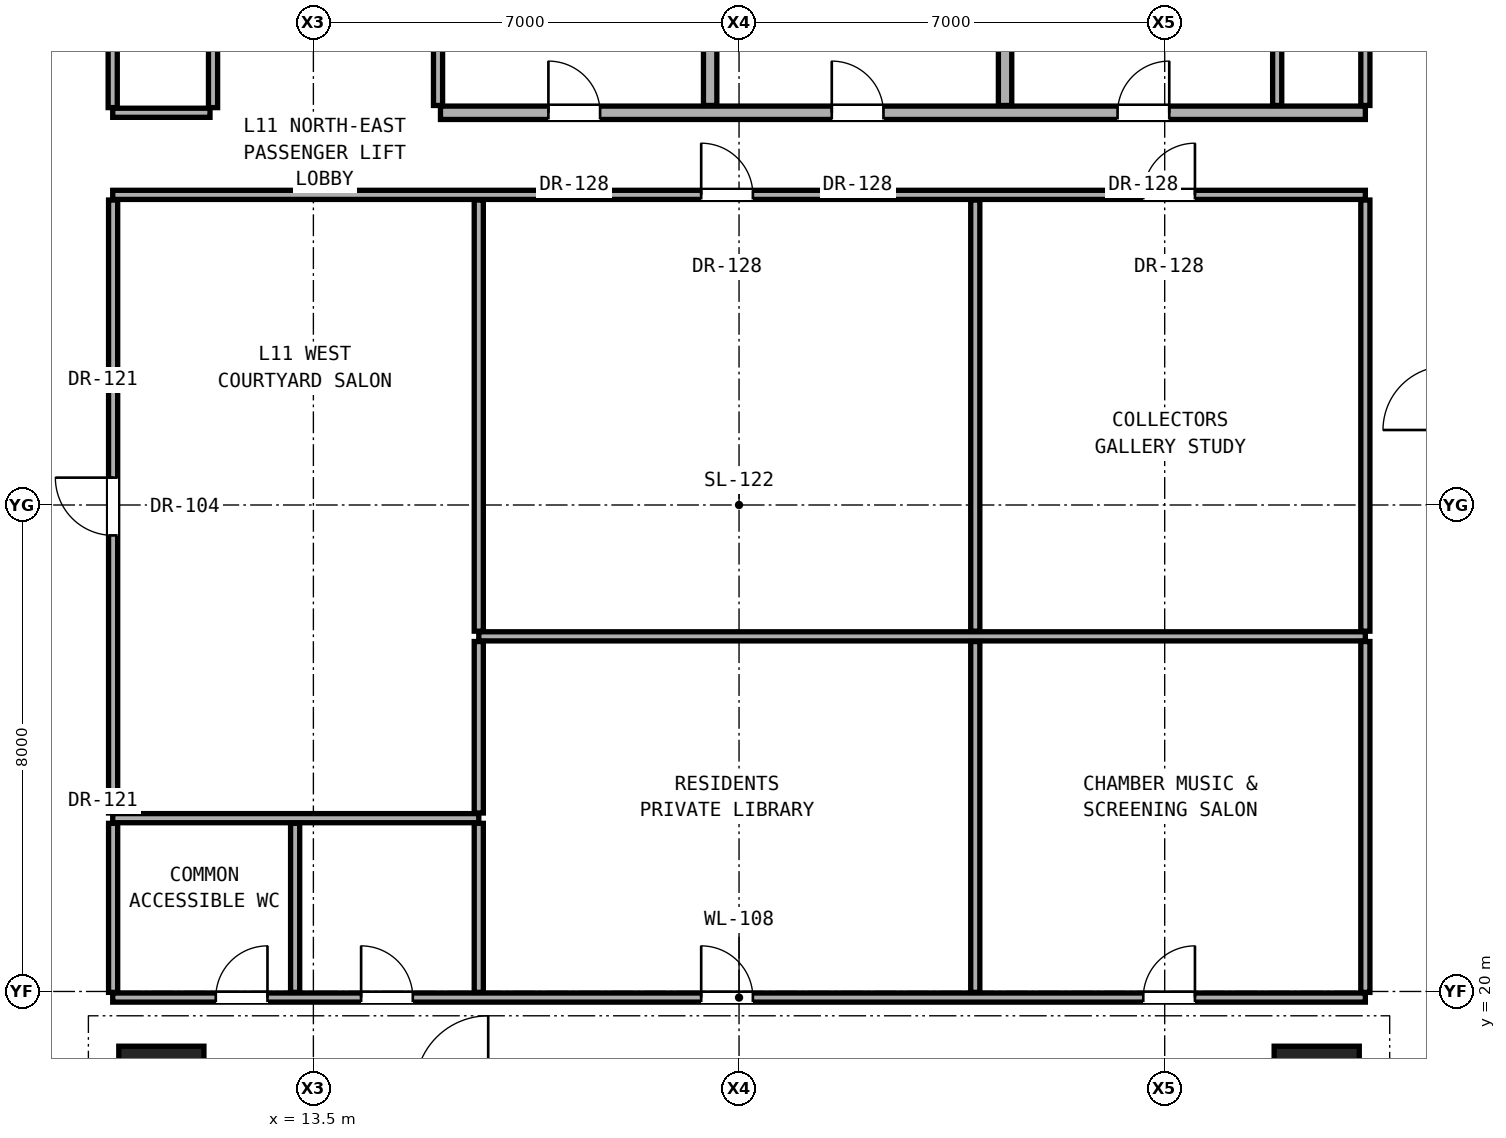
"""IFC4 building model, lengths in metres.
Left out: names, types, materials, properties, quantities, classifications, styles, units other than length and angle.
Written with IfcOpenShell. Run it as: python <this file> out.ifc"""

import sys

from ifc_helpers import new_model, si_unit, direction, frame, frame_2d, origin, origin_2d, place, context, subcontext, project, spatial, rectangle, extrude, element, fill, save


model = new_model("IFC4")
c1 = context("Model", 3, precision=1e-05, world=origin(), true_north=direction((0.0, 1.0)))
c2 = subcontext(c1, "Body", "Model", "MODEL_VIEW")
j1 = project(units=[si_unit("LENGTHUNIT", "METRE"), si_unit("PLANEANGLEUNIT", "RADIAN")], contexts=[c1])
p1 = place(None, origin())
s1 = spatial("IfcSite", under=j1, at=p1, CompositionType="ELEMENT")
p2 = place(p1, origin())
s2 = spatial("IfcBuilding", under=s1, at=p2, CompositionType="ELEMENT")
p3 = place(p2, frame((0.0, 0.0, 42.2)))
s3 = spatial("IfcBuildingStorey", under=s2, at=p3, CompositionType="ELEMENT", Elevation=42.2)
for number, where, z_axis, x_axis in (
    (1, (11.0, 18.4, 0.0), (0.0, 0.0, 1.0), (1.0, 0.0, 0.0)),
    (2, (30.0, 18.4, 0.0), (0.0, 0.0, 1.0), (1.0, 0.0, 0.0)),
):
    element("IfcColumn", number, at=place(p3, frame(where, z_axis=z_axis, x_axis=x_axis)), inside=s3, PredefinedType="COLUMN", context=c2, shape_type="SweptSolid", body=[
        extrude(rectangle(XDim=1.4, YDim=1.4, at=origin_2d()), origin(), (0.0, 0.0, 1.0), 3.3),
    ])
p4 = place(p3, frame((10.2, 19.9, 0.0), z_axis=(0.0, 0.0, 1.0), x_axis=(1.0, 0.0, 0.0)))
e3 = element("IfcWall", 3, at=p4, inside=s3, PredefinedType="PARTITIONING", context=c2, shape_type="SweptSolid", body=[
    extrude(rectangle(XDim=20.6, YDim=0.15, at=frame_2d((10.3, 0.0))), origin(), (0.0, 0.0, 1.0), 2.104),
])
p5 = place(p4, frame((1.695, 0.0, 0.0)))
e4 = element("IfcOpeningElement", 4, at=p5, cuts=e3, PredefinedType="OPENING", context=c2, shape_type="SweptSolid", body=[
    extrude(rectangle(XDim=0.85, YDim=2.01, at=frame_2d((0.425, 1.005))), frame((0.0, 0.085, 0.0), z_axis=(0.0, -1.0, 0.0), x_axis=(1.0, 0.0, 0.0)), (0.0, 0.0, 1.0), 0.17),
])
p6 = place(p4, frame((4.085, 0.0, 0.0)))
e5 = element("IfcOpeningElement", 5, at=p6, cuts=e3, PredefinedType="OPENING", context=c2, shape_type="SweptSolid", body=[
    extrude(rectangle(XDim=0.85, YDim=2.01, at=frame_2d((0.425, 1.005))), frame((0.0, 0.085, 0.0), z_axis=(0.0, -1.0, 0.0), x_axis=(1.0, 0.0, 0.0)), (0.0, 0.0, 1.0), 0.17),
])
p7 = place(p4, frame((9.677, 0.0, 0.0)))
e6 = element("IfcOpeningElement", 6, at=p7, cuts=e3, PredefinedType="OPENING", context=c2, shape_type="SweptSolid", body=[
    extrude(rectangle(XDim=0.85, YDim=2.01, at=frame_2d((0.425, 1.005))), frame((0.0, 0.085, 0.0), z_axis=(0.0, -1.0, 0.0), x_axis=(1.0, 0.0, 0.0)), (0.0, 0.0, 1.0), 0.17),
])
p8 = place(p4, frame((16.948, 0.0, 0.0)))
e7 = element("IfcOpeningElement", 7, at=p8, cuts=e3, PredefinedType="OPENING", context=c2, shape_type="SweptSolid", body=[
    extrude(rectangle(XDim=0.85, YDim=2.01, at=frame_2d((0.425, 1.005))), frame((0.0, 0.085, 0.0), z_axis=(0.0, -1.0, 0.0), x_axis=(1.0, 0.0, 0.0)), (0.0, 0.0, 1.0), 0.17),
])
p9 = place(p3, frame((10.2, 22.85, 0.0), z_axis=(0.0, 0.0, 1.0), x_axis=(1.0, 0.0, 0.0)))
e8 = element("IfcWall", 8, at=p9, inside=s3, PredefinedType="PARTITIONING", context=c2, shape_type="SweptSolid", body=[
    extrude(rectangle(XDim=6.02, YDim=0.15, at=frame_2d((3.01, 0.0))), origin(), (0.0, 0.0, 1.0), 2.104),
])
p10 = place(p3, frame((16.22, 25.84, 0.0), z_axis=(0.0, 0.0, 1.0), x_axis=(1.0, 0.0, 0.0)))
e9 = element("IfcWall", 9, at=p10, inside=s3, PredefinedType="PARTITIONING", context=c2, shape_type="SweptSolid", body=[
    extrude(rectangle(XDim=14.58, YDim=0.15, at=frame_2d((7.29, 0.0))), origin(), (0.0, 0.0, 1.0), 2.104),
])
p11 = place(p3, frame((10.2, 33.1, 0.0), z_axis=(0.0, 0.0, 1.0), x_axis=(1.0, 0.0, 0.0)))
e10 = element("IfcWall", 10, at=p11, inside=s3, PredefinedType="PARTITIONING", context=c2, shape_type="SweptSolid", body=[
    extrude(rectangle(XDim=20.6, YDim=0.15, at=frame_2d((10.3, 0.0))), origin(), (0.0, 0.0, 1.0), 2.104),
])
p12 = place(p11, frame((9.677, 0.0, 0.0)))
e11 = element("IfcOpeningElement", 11, at=p12, cuts=e10, PredefinedType="OPENING", context=c2, shape_type="SweptSolid", body=[
    extrude(rectangle(XDim=0.85, YDim=2.01, at=frame_2d((0.425, 1.005))), frame((0.0, 0.085, 0.0), z_axis=(0.0, -1.0, 0.0), x_axis=(1.0, 0.0, 0.0)), (0.0, 0.0, 1.0), 0.17),
])
p13 = place(p11, frame((16.948, 0.0, 0.0)))
e12 = element("IfcOpeningElement", 12, at=p13, cuts=e10, PredefinedType="OPENING", context=c2, shape_type="SweptSolid", body=[
    extrude(rectangle(XDim=0.85, YDim=2.01, at=frame_2d((0.425, 1.005))), frame((0.0, 0.085, 0.0), z_axis=(0.0, -1.0, 0.0), x_axis=(1.0, 0.0, 0.0)), (0.0, 0.0, 1.0), 0.17),
])
p14 = place(p3, frame((10.2, 34.45, 0.0), z_axis=(0.0, 0.0, 1.0), x_axis=(1.0, 0.0, 0.0)))
e13 = element("IfcWall", 13, at=p14, inside=s3, PredefinedType="PARTITIONING", context=c2, shape_type="SweptSolid", body=[
    extrude(rectangle(XDim=1.6, YDim=0.15, at=frame_2d((0.8, 0.0))), origin(), (0.0, 0.0, 1.0), 2.104),
])
p15 = place(p3, frame((15.59, 34.45, 0.0), z_axis=(0.0, 0.0, 1.0), x_axis=(1.0, 0.0, 0.0)))
e14 = element("IfcWall", 14, at=p15, inside=s3, PredefinedType="SOLIDWALL", context=c2, shape_type="SweptSolid", body=[
    extrude(rectangle(XDim=15.21, YDim=0.22, at=frame_2d((7.605, 0.0))), origin(), (0.0, 0.0, 1.0), 2.104),
])
p16 = place(p15, frame((6.435, 0.0, 0.0)))
e15 = element("IfcOpeningElement", 15, at=p16, cuts=e14, PredefinedType="OPENING", context=c2, shape_type="SweptSolid", body=[
    extrude(rectangle(XDim=0.85, YDim=2.01, at=frame_2d((0.425, 1.005))), frame((0.0, 0.12, 0.0), z_axis=(0.0, -1.0, 0.0), x_axis=(1.0, 0.0, 0.0)), (0.0, 0.0, 1.0), 0.24),
])
p17 = place(p15, frame((11.135, 0.0, 0.0)))
e16 = element("IfcOpeningElement", 16, at=p17, cuts=e14, PredefinedType="OPENING", context=c2, shape_type="SweptSolid", body=[
    extrude(rectangle(XDim=0.85, YDim=2.01, at=frame_2d((0.425, 1.005))), frame((0.0, 0.12, 0.0), z_axis=(0.0, -1.0, 0.0), x_axis=(1.0, 0.0, 0.0)), (0.0, 0.0, 1.0), 0.24),
])
p18 = place(p15, frame((1.775, 0.0, 0.0)))
e17 = element("IfcOpeningElement", 17, at=p18, cuts=e14, PredefinedType="OPENING", context=c2, shape_type="SweptSolid", body=[
    extrude(rectangle(XDim=0.85, YDim=2.01, at=frame_2d((0.425, 1.005))), frame((0.0, 0.12, 0.0), z_axis=(0.0, -1.0, 0.0), x_axis=(1.0, 0.0, 0.0)), (0.0, 0.0, 1.0), 0.24),
])
p19 = place(p3, frame((10.207, 19.985, 0.0), z_axis=(0.0, 0.0, 1.0), x_axis=(0.0, 1.0, 0.0)))
e18 = element("IfcWall", 18, at=p19, inside=s3, PredefinedType="PARTITIONING", context=c2, shape_type="SweptSolid", body=[
    extrude(rectangle(XDim=2.78, YDim=0.15, at=frame_2d((1.39, 0.0))), origin(), (0.0, 0.0, 1.0), 3.06),
])
p20 = place(p3, frame((10.207, 22.935, 0.0), z_axis=(0.0, 0.0, 1.0), x_axis=(0.0, 1.0, 0.0)))
e19 = element("IfcWall", 19, at=p20, inside=s3, PredefinedType="PARTITIONING", context=c2, shape_type="SweptSolid", body=[
    extrude(rectangle(XDim=10.08, YDim=0.15, at=frame_2d((5.04, 0.0))), origin(), (0.0, 0.0, 1.0), 2.279),
])
p21 = place(p20, frame((4.565, 0.0, 0.0)))
e20 = element("IfcOpeningElement", 20, at=p21, cuts=e19, PredefinedType="OPENING", context=c2, shape_type="SweptSolid", body=[
    extrude(rectangle(XDim=0.95, YDim=2.15, at=frame_2d((0.475, 1.075))), frame((0.0, 0.085, 0.0), z_axis=(0.0, -1.0, 0.0), x_axis=(1.0, 0.0, 0.0)), (0.0, 0.0, 1.0), 0.17),
])
p22 = place(p3, frame((10.2, 34.535, 0.0), z_axis=(0.0, 0.0, 1.0), x_axis=(0.0, 1.0, 0.0)))
e21 = element("IfcWall", 21, at=p22, inside=s3, PredefinedType="PARTITIONING", context=c2, shape_type="SweptSolid", body=[
    extrude(rectangle(XDim=9.13, YDim=0.15, at=frame_2d((4.565, 0.0))), origin(), (0.0, 0.0, 1.0), 2.436),
])
p23 = place(p3, frame((11.85, 34.535, 0.0), z_axis=(0.0, 0.0, 1.0), x_axis=(0.0, 1.0, 0.0)))
e22 = element("IfcWall", 22, at=p23, inside=s3, PredefinedType="PARTITIONING", context=c2, shape_type="SweptSolid", body=[
    extrude(rectangle(XDim=2.695, YDim=0.15, at=frame_2d((1.348, 0.0))), origin(), (0.0, 0.0, 1.0), 3.06),
])
p24 = place(p3, frame((13.2, 19.985, 0.0), z_axis=(0.0, 0.0, 1.0), x_axis=(0.0, 1.0, 0.0)))
e23 = element("IfcWall", 23, at=p24, inside=s3, PredefinedType="PARTITIONING", context=c2, shape_type="SweptSolid", body=[
    extrude(rectangle(XDim=2.78, YDim=0.15, at=frame_2d((1.39, 0.0))), origin(), (0.0, 0.0, 1.0), 3.06),
])
p25 = place(p3, frame((15.55, 34.57, 0.0), z_axis=(0.0, 0.0, 1.0), x_axis=(0.0, 1.0, 0.0)))
e24 = element("IfcWall", 24, at=p25, inside=s3, PredefinedType="PARTITIONING", context=c2, shape_type="SweptSolid", body=[
    extrude(rectangle(XDim=2.66, YDim=0.15, at=frame_2d((1.33, 0.0))), origin(), (0.0, 0.0, 1.0), 2.589),
])
p26 = place(p3, frame((16.22, 19.985, 0.0), z_axis=(0.0, 0.0, 1.0), x_axis=(0.0, 1.0, 0.0)))
e25 = element("IfcWall", 25, at=p26, inside=s3, PredefinedType="PARTITIONING", context=c2, shape_type="SweptSolid", body=[
    extrude(rectangle(XDim=2.78, YDim=0.15, at=frame_2d((1.39, 0.0))), origin(), (0.0, 0.0, 1.0), 3.06),
])
p27 = place(p3, frame((16.22, 22.935, 0.0), z_axis=(0.0, 0.0, 1.0), x_axis=(0.0, 1.0, 0.0)))
e26 = element("IfcWall", 26, at=p27, inside=s3, PredefinedType="PARTITIONING", context=c2, shape_type="SweptSolid", body=[
    extrude(rectangle(XDim=2.82, YDim=0.15, at=frame_2d((1.41, 0.0))), origin(), (0.0, 0.0, 1.0), 2.104),
])
p28 = place(p3, frame((16.22, 25.925, 0.0), z_axis=(0.0, 0.0, 1.0), x_axis=(0.0, 1.0, 0.0)))
e27 = element("IfcWall", 27, at=p28, inside=s3, PredefinedType="PARTITIONING", context=c2, shape_type="SweptSolid", body=[
    extrude(rectangle(XDim=7.09, YDim=0.15, at=frame_2d((3.545, 0.0))), origin(), (0.0, 0.0, 1.0), 2.104),
])
p29 = place(p3, frame((20.025, 34.57, 0.0), z_axis=(0.0, 0.0, 1.0), x_axis=(0.0, 1.0, 0.0)))
e28 = element("IfcWall", 28, at=p29, inside=s3, PredefinedType="SOLIDWALL", context=c2, shape_type="SweptSolid", body=[
    extrude(rectangle(XDim=2.66, YDim=0.22, at=frame_2d((1.33, 0.0))), origin(), (0.0, 0.0, 1.0), 3.06),
])
p30 = place(p3, frame((24.385, 19.985, 0.0), z_axis=(0.0, 0.0, 1.0), x_axis=(0.0, 1.0, 0.0)))
e29 = element("IfcWall", 29, at=p30, inside=s3, PredefinedType="PARTITIONING", context=c2, shape_type="SweptSolid", body=[
    extrude(rectangle(XDim=5.77, YDim=0.15, at=frame_2d((2.885, 0.0))), origin(), (0.0, 0.0, 1.0), 2.104),
])
p31 = place(p3, frame((24.385, 25.925, 0.0), z_axis=(0.0, 0.0, 1.0), x_axis=(0.0, 1.0, 0.0)))
e30 = element("IfcWall", 30, at=p31, inside=s3, PredefinedType="PARTITIONING", context=c2, shape_type="SweptSolid", body=[
    extrude(rectangle(XDim=7.09, YDim=0.15, at=frame_2d((3.545, 0.0))), origin(), (0.0, 0.0, 1.0), 2.104),
])
p32 = place(p3, frame((24.875, 34.57, 0.0), z_axis=(0.0, 0.0, 1.0), x_axis=(0.0, 1.0, 0.0)))
e31 = element("IfcWall", 31, at=p32, inside=s3, PredefinedType="SOLIDWALL", context=c2, shape_type="SweptSolid", body=[
    extrude(rectangle(XDim=2.66, YDim=0.22, at=frame_2d((1.33, 0.0))), origin(), (0.0, 0.0, 1.0), 3.06),
])
p33 = place(p3, frame((29.35, 34.57, 0.0), z_axis=(0.0, 0.0, 1.0), x_axis=(0.0, 1.0, 0.0)))
e32 = element("IfcWall", 32, at=p33, inside=s3, PredefinedType="PARTITIONING", context=c2, shape_type="SweptSolid", body=[
    extrude(rectangle(XDim=2.66, YDim=0.15, at=frame_2d((1.33, 0.0))), origin(), (0.0, 0.0, 1.0), 3.06),
])
p34 = place(p3, frame((30.8, 19.985, 0.0), z_axis=(0.0, 0.0, 1.0), x_axis=(0.0, 1.0, 0.0)))
e33 = element("IfcWall", 33, at=p34, inside=s3, PredefinedType="PARTITIONING", context=c2, shape_type="SweptSolid", body=[
    extrude(rectangle(XDim=5.77, YDim=0.15, at=frame_2d((2.885, 0.0))), origin(), (0.0, 0.0, 1.0), 2.279),
])
p35 = place(p3, frame((30.8, 25.925, 0.0), z_axis=(0.0, 0.0, 1.0), x_axis=(0.0, 1.0, 0.0)))
e34 = element("IfcWall", 34, at=p35, inside=s3, PredefinedType="PARTITIONING", context=c2, shape_type="SweptSolid", body=[
    extrude(rectangle(XDim=7.09, YDim=0.15, at=frame_2d((3.545, 0.0))), origin(), (0.0, 0.0, 1.0), 2.279),
])
p36 = place(p3, frame((30.8, 34.57, 0.0), z_axis=(0.0, 0.0, 1.0), x_axis=(0.0, 1.0, 0.0)))
e35 = element("IfcWall", 35, at=p36, inside=s3, PredefinedType="PARTITIONING", context=c2, shape_type="SweptSolid", body=[
    extrude(rectangle(XDim=9.095, YDim=0.15, at=frame_2d((4.547, 0.0))), origin(), (0.0, 0.0, 1.0), 2.436),
])
p37 = place(p16, origin())
e36 = element("IfcDoor", 36, at=p37, inside=s3, OperationType="SINGLE_SWING_LEFT", PredefinedType="DOOR", context=c2, shape_type="SweptSolid", body=[
    extrude(rectangle(XDim=0.85, YDim=2.01, at=frame_2d((0.425, 1.005))), frame((0.0, 0.025, 0.0), z_axis=(0.0, -1.0, 0.0), x_axis=(1.0, 0.0, 0.0)), (0.0, 0.0, 1.0), 0.05),
])
fill(e15, e36)
p38 = place(p17, origin())
e37 = element("IfcDoor", 37, at=p38, inside=s3, OperationType="SINGLE_SWING_RIGHT", PredefinedType="DOOR", context=c2, shape_type="SweptSolid", body=[
    extrude(rectangle(XDim=0.85, YDim=2.01, at=frame_2d((0.425, 1.005))), frame((0.0, 0.025, 0.0), z_axis=(0.0, -1.0, 0.0), x_axis=(1.0, 0.0, 0.0)), (0.0, 0.0, 1.0), 0.05),
])
fill(e16, e37)
p39 = place(p18, origin())
e38 = element("IfcDoor", 38, at=p39, inside=s3, OperationType="SINGLE_SWING_LEFT", PredefinedType="DOOR", context=c2, shape_type="SweptSolid", body=[
    extrude(rectangle(XDim=0.85, YDim=2.01, at=frame_2d((0.425, 1.005))), frame((0.0, 0.025, 0.0), z_axis=(0.0, -1.0, 0.0), x_axis=(1.0, 0.0, 0.0)), (0.0, 0.0, 1.0), 0.05),
])
fill(e17, e38)
p40 = place(p5, origin())
e39 = element("IfcDoor", 39, at=p40, inside=s3, OperationType="SINGLE_SWING_RIGHT", PredefinedType="DOOR", context=c2, shape_type="SweptSolid", body=[
    extrude(rectangle(XDim=0.85, YDim=2.01, at=frame_2d((0.425, 1.005))), frame((0.0, 0.025, 0.0), z_axis=(0.0, -1.0, 0.0), x_axis=(1.0, 0.0, 0.0)), (0.0, 0.0, 1.0), 0.05),
])
fill(e4, e39)
p41 = place(p6, origin())
e40 = element("IfcDoor", 40, at=p41, inside=s3, OperationType="SINGLE_SWING_LEFT", PredefinedType="DOOR", context=c2, shape_type="SweptSolid", body=[
    extrude(rectangle(XDim=0.85, YDim=2.01, at=frame_2d((0.425, 1.005))), frame((0.0, 0.025, 0.0), z_axis=(0.0, -1.0, 0.0), x_axis=(1.0, 0.0, 0.0)), (0.0, 0.0, 1.0), 0.05),
])
fill(e5, e40)
p42 = place(p21, origin())
e41 = element("IfcDoor", 41, at=p42, inside=s3, OperationType="SINGLE_SWING_RIGHT", PredefinedType="DOOR", context=c2, shape_type="SweptSolid", body=[
    extrude(rectangle(XDim=0.95, YDim=2.15, at=frame_2d((0.475, 1.075))), frame((0.0, 0.025, 0.0), z_axis=(0.0, -1.0, 0.0), x_axis=(1.0, 0.0, 0.0)), (0.0, 0.0, 1.0), 0.05),
])
fill(e20, e41)
p43 = place(p7, origin())
e42 = element("IfcDoor", 42, at=p43, inside=s3, OperationType="SINGLE_SWING_LEFT", PredefinedType="DOOR", context=c2, shape_type="SweptSolid", body=[
    extrude(rectangle(XDim=0.85, YDim=2.01, at=frame_2d((0.425, 1.005))), frame((0.0, 0.025, 0.0), z_axis=(0.0, -1.0, 0.0), x_axis=(1.0, 0.0, 0.0)), (0.0, 0.0, 1.0), 0.05),
])
fill(e6, e42)
p44 = place(p8, origin())
e43 = element("IfcDoor", 43, at=p44, inside=s3, OperationType="SINGLE_SWING_RIGHT", PredefinedType="DOOR", context=c2, shape_type="SweptSolid", body=[
    extrude(rectangle(XDim=0.85, YDim=2.01, at=frame_2d((0.425, 1.005))), frame((0.0, 0.025, 0.0), z_axis=(0.0, -1.0, 0.0), x_axis=(1.0, 0.0, 0.0)), (0.0, 0.0, 1.0), 0.05),
])
fill(e7, e43)
p45 = place(p12, origin())
e44 = element("IfcDoor", 44, at=p45, inside=s3, OperationType="SINGLE_SWING_LEFT", PredefinedType="DOOR", context=c2, shape_type="SweptSolid", body=[
    extrude(rectangle(XDim=0.85, YDim=2.01, at=frame_2d((0.425, 1.005))), frame((0.0, 0.025, 0.0), z_axis=(0.0, -1.0, 0.0), x_axis=(1.0, 0.0, 0.0)), (0.0, 0.0, 1.0), 0.05),
])
fill(e11, e44)
p46 = place(p13, origin())
e45 = element("IfcDoor", 45, at=p46, inside=s3, OperationType="SINGLE_SWING_RIGHT", PredefinedType="DOOR", context=c2, shape_type="SweptSolid", body=[
    extrude(rectangle(XDim=0.85, YDim=2.01, at=frame_2d((0.425, 1.005))), frame((0.0, 0.025, 0.0), z_axis=(0.0, -1.0, 0.0), x_axis=(1.0, 0.0, 0.0)), (0.0, 0.0, 1.0), 0.05),
])
fill(e12, e45)
save(model, sys.argv[1])
